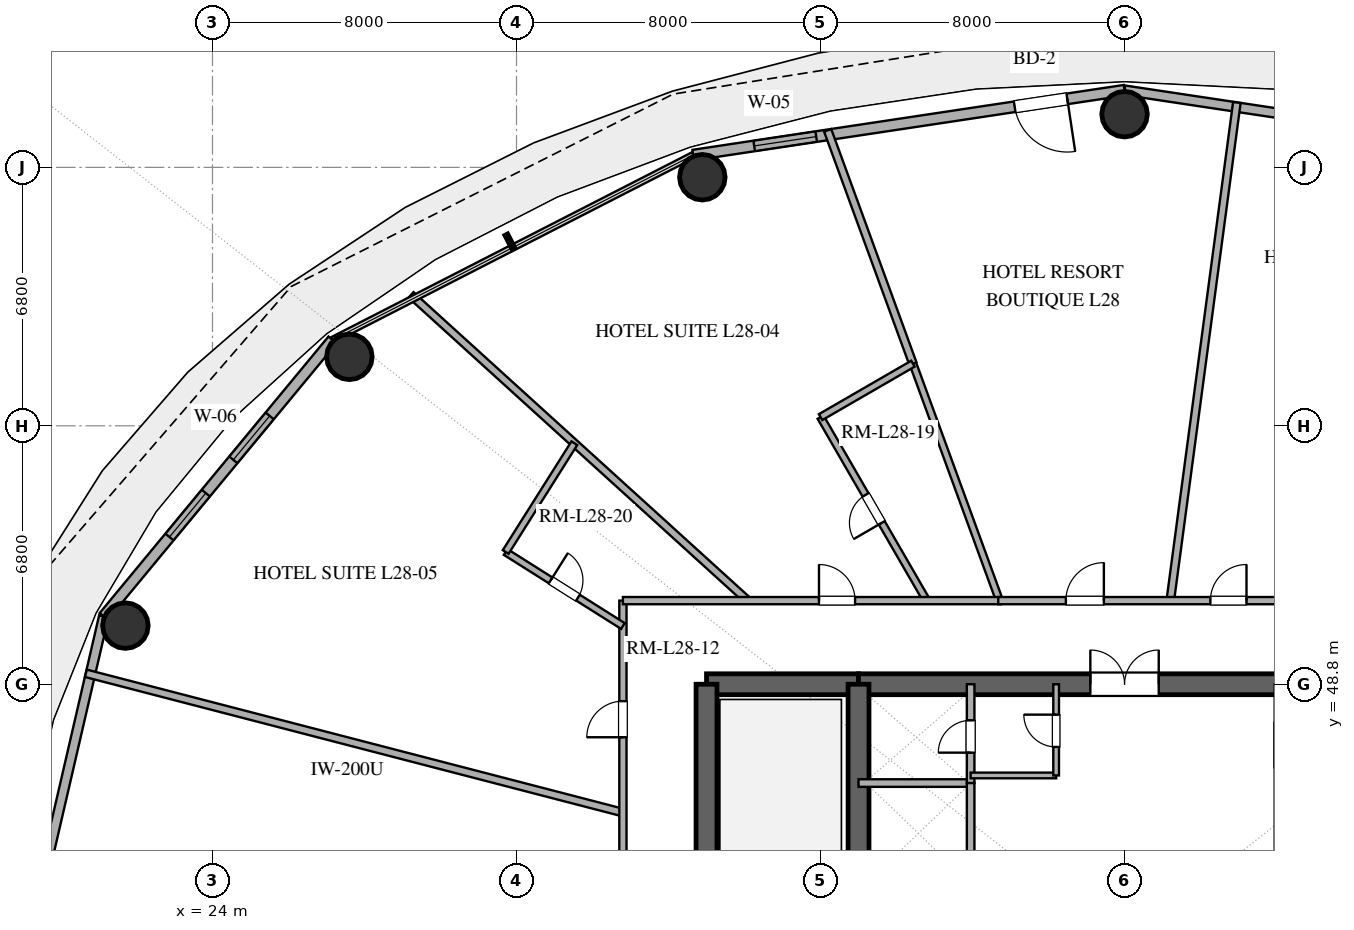
"""IFC4 building model, lengths in metres.
Left out: names, types, materials, properties, quantities, classifications, styles, units other than length and angle.
Written with IfcOpenShell. Run it as: python <this file> out.ifc"""

import sys

from ifc_helpers import new_model, si_unit, direction, frame, frame_2d, origin, origin_2d, place, context, subcontext, project, spatial, rectangle, hollow_circle, extrude, element, fill, save


model = new_model("IFC4")
c1 = context("Model", 3, precision=1e-05, world=origin(), true_north=direction((0.0, 1.0)))
c2 = subcontext(c1, "Body", "Model", "MODEL_VIEW")
j1 = project(units=[si_unit("LENGTHUNIT", "METRE"), si_unit("PLANEANGLEUNIT", "RADIAN")], contexts=[c1])
p1 = place(None, origin())
s1 = spatial("IfcSite", under=j1, at=p1, CompositionType="ELEMENT")
p2 = place(p1, origin())
s2 = spatial("IfcBuilding", under=s1, at=p2, CompositionType="ELEMENT")
p3 = place(p2, frame((0.0, 0.0, 112.8)))
s3 = spatial("IfcBuildingStorey", under=s2, at=p3, CompositionType="ELEMENT", Elevation=112.8)
p4 = place(p3, frame((37.0, 48.8, 0.0), z_axis=(0.0, 0.0, 1.0), x_axis=(1.0, 0.0, 0.0)))
e1 = element("IfcWall", 1, at=p4, inside=s3, PredefinedType="SHEAR", context=c2, shape_type="SweptSolid", body=[
    extrude(rectangle(XDim=4.0, YDim=0.55, at=frame_2d((2.0, 0.0))), origin(), (0.0, 0.0, 1.0), 3.38),
])
p5 = place(p3, frame((41.0, 48.8, 0.0), z_axis=(0.0, 0.0, 1.0), x_axis=(1.0, 0.0, 0.0)))
e2 = element("IfcWall", 2, at=p5, inside=s3, PredefinedType="SHEAR", context=c2, shape_type="SweptSolid", body=[
    extrude(rectangle(XDim=14.0, YDim=0.55, at=frame_2d((7.0, 0.0))), origin(), (0.0, 0.0, 1.0), 3.38),
])
p6 = place(p5, frame((6.1, 0.0, 0.0)))
e3 = element("IfcOpeningElement", 3, at=p6, cuts=e2, PredefinedType="OPENING", context=c2, shape_type="SweptSolid", body=[
    extrude(rectangle(XDim=1.8, YDim=2.25, at=frame_2d((0.9, 1.125))), frame((0.0, 0.285, 0.0), z_axis=(0.0, -1.0, 0.0), x_axis=(1.0, 0.0, 0.0)), (0.0, 0.0, 1.0), 0.57),
])
p7 = place(p3, frame((37.0, 35.2, 0.0), z_axis=(0.0, 0.0, 1.0), x_axis=(0.0, 1.0, 0.0)))
e4 = element("IfcWall", 4, at=p7, inside=s3, PredefinedType="SHEAR", context=c2, shape_type="SweptSolid", body=[
    extrude(rectangle(XDim=13.6, YDim=0.55, at=frame_2d((6.8, 0.0))), origin(), (0.0, 0.0, 1.0), 3.38),
])
p8 = place(p7, frame((1.5, 0.0, 0.0)))
e5 = element("IfcOpeningElement", 5, at=p8, cuts=e4, PredefinedType="OPENING", context=c2, shape_type="SweptSolid", body=[
    extrude(rectangle(XDim=1.2, YDim=2.15, at=frame_2d((0.6, 1.075))), frame((0.0, 0.285, 0.0), z_axis=(0.0, -1.0, 0.0), x_axis=(1.0, 0.0, 0.0)), (0.0, 0.0, 1.0), 0.57),
])
p9 = place(p3, frame((41.0, 35.2, 0.0), z_axis=(0.0, 0.0, 1.0), x_axis=(0.0, 1.0, 0.0)))
e6 = element("IfcWall", 6, at=p9, inside=s3, PredefinedType="SHEAR", context=c2, shape_type="SweptSolid", body=[
    extrude(rectangle(XDim=13.6, YDim=0.55, at=frame_2d((6.8, 0.0))), origin(), (0.0, 0.0, 1.0), 3.38),
])
p10 = place(p9, frame((1.15, 0.0, 0.0)))
e7 = element("IfcOpeningElement", 7, at=p10, cuts=e6, PredefinedType="OPENING", context=c2, shape_type="SweptSolid", body=[
    extrude(rectangle(XDim=1.1, YDim=2.2, at=frame_2d((0.55, 1.1))), frame((0.0, 0.285, 0.0), z_axis=(0.0, -1.0, 0.0), x_axis=(1.0, 0.0, 0.0)), (0.0, 0.0, 1.0), 0.57),
])
for number, where, z_axis, x_axis in (
    (8, (48.0, 63.8, 0.0), (0.0, 0.0, 1.0), (1.0, 0.0, 0.0)),
    (9, (36.89, 62.141, 0.0), (0.0, 0.0, 1.0), (1.0, 0.0, 0.0)),
    (10, (27.602, 57.415, 0.0), (0.0, 0.0, 1.0), (1.0, 0.0, 0.0)),
    (11, (21.709, 50.343, 0.0), (0.0, 0.0, 1.0), (1.0, 0.0, 0.0)),
):
    element("IfcColumn", number, at=place(p3, frame(where, z_axis=z_axis, x_axis=x_axis)), inside=s3, PredefinedType="COLUMN", context=c2, shape_type="SweptSolid", body=[
        extrude(hollow_circle(Radius=0.6, WallThickness=0.032, at=origin_2d()), origin(), (0.0, 0.0, 1.0), 3.38),
    ])
p11 = place(p3, frame((59.351, 62.723, 0.0), z_axis=(0.0, 0.0, 1.0), x_axis=(-0.988877774656, 0.148730450117, 0.0)))
e12 = element("IfcWall", 12, at=p11, inside=s3, PredefinedType="SOLIDWALL", context=c2, shape_type="SweptSolid", body=[
    extrude(rectangle(XDim=11.479, YDim=0.25, at=frame_2d((5.74, 0.0))), origin(), (0.0, 0.0, 1.0), 3.38),
])
p12 = place(p3, frame((48.0, 64.43, 0.0), z_axis=(0.0, 0.0, 1.0), x_axis=(-0.988877774656, -0.148730450117, 0.0)))
e13 = element("IfcWall", 13, at=p12, inside=s3, PredefinedType="SOLIDWALL", context=c2, shape_type="SweptSolid", body=[
    extrude(rectangle(XDim=11.479, YDim=0.28, at=frame_2d((5.74, 0.0))), origin(), (0.0, 0.0, 1.0), 3.38),
])
p13 = place(p12, frame((1.524, 0.0, 0.0)))
e14 = element("IfcOpeningElement", 14, at=p13, cuts=e13, PredefinedType="OPENING", context=c2, shape_type="SweptSolid", body=[
    extrude(rectangle(XDim=1.4, YDim=2.2, at=frame_2d((0.7, 1.1))), frame((0.0, 0.15, 0.0), z_axis=(0.0, -1.0, 0.0), x_axis=(1.0, 0.0, 0.0)), (0.0, 0.0, 1.0), 0.3),
])
p14 = place(p12, frame((8.205, 0.0, 0.85)))
e15 = element("IfcOpeningElement", 15, at=p14, cuts=e13, PredefinedType="OPENING", context=c2, shape_type="SweptSolid", body=[
    extrude(rectangle(XDim=1.65, YDim=2.0, at=frame_2d((0.825, 1.0))), frame((0.0, 0.15, 0.0), z_axis=(0.0, -1.0, 0.0), x_axis=(1.0, 0.0, 0.0)), (0.0, 0.0, 1.0), 0.3),
])
p15 = place(p3, frame((27.16, 57.86, 0.0), z_axis=(0.0, 0.0, 1.0), x_axis=(-0.637505817448, -0.770445541696, 0.0)))
e16 = element("IfcWall", 16, at=p15, inside=s3, PredefinedType="SOLIDWALL", context=c2, shape_type="SweptSolid", body=[
    extrude(rectangle(XDim=9.445, YDim=0.28, at=frame_2d((4.723, 0.0))), origin(), (0.0, 0.0, 1.0), 3.38),
])
p16 = place(p15, frame((2.597, 0.0, 0.85)))
e17 = element("IfcOpeningElement", 17, at=p16, cuts=e16, PredefinedType="OPENING", context=c2, shape_type="SweptSolid", body=[
    extrude(rectangle(XDim=1.5, YDim=2.0, at=frame_2d((0.75, 1.0))), frame((0.0, 0.15, 0.0), z_axis=(0.0, -1.0, 0.0), x_axis=(1.0, 0.0, 0.0)), (0.0, 0.0, 1.0), 0.3),
])
p17 = place(p15, frame((5.232, 0.0, 0.85)))
e18 = element("IfcOpeningElement", 18, at=p17, cuts=e16, PredefinedType="OPENING", context=c2, shape_type="SweptSolid", body=[
    extrude(rectangle(XDim=1.5, YDim=2.0, at=frame_2d((0.75, 1.0))), frame((0.0, 0.15, 0.0), z_axis=(0.0, -1.0, 0.0), x_axis=(1.0, 0.0, 0.0)), (0.0, 0.0, 1.0), 0.3),
])
p18 = place(p3, frame((21.139, 50.583, 0.0), z_axis=(0.0, 0.0, 1.0), x_axis=(-0.22558597182, -0.974223264616, 0.0)))
e19 = element("IfcWall", 19, at=p18, inside=s3, PredefinedType="SOLIDWALL", context=c2, shape_type="SweptSolid", body=[
    extrude(rectangle(XDim=8.811, YDim=0.25, at=frame_2d((4.405, 0.0))), origin(), (0.0, 0.0, 1.0), 3.38),
])
p19 = place(p3, frame((41.0, 46.2, 0.0), z_axis=(0.0, 0.0, 1.0), x_axis=(1.0, 0.0, 0.0)))
e20 = element("IfcWall", 20, at=p19, inside=s3, PredefinedType="SOLIDWALL", context=c2, shape_type="SweptSolid", body=[
    extrude(rectangle(XDim=2.95, YDim=0.2, at=frame_2d((1.475, 0.0))), origin(), (0.0, 0.0, 1.0), 2.74),
])
p20 = place(p3, frame((43.95, 46.2, 0.0), z_axis=(0.0, 0.0, 1.0), x_axis=(0.0, 1.0, 0.0)))
e21 = element("IfcWall", 21, at=p20, inside=s3, PredefinedType="SOLIDWALL", context=c2, shape_type="SweptSolid", body=[
    extrude(rectangle(XDim=2.6, YDim=0.2, at=frame_2d((1.3, 0.0))), origin(), (0.0, 0.0, 1.0), 2.74),
])
p21 = place(p20, frame((0.8, 0.0, 0.0)))
e22 = element("IfcOpeningElement", 22, at=p21, cuts=e21, PredefinedType="OPENING", context=c2, shape_type="SweptSolid", body=[
    extrude(rectangle(XDim=0.85, YDim=2.15, at=frame_2d((0.425, 1.075))), frame((0.0, 0.11, 0.0), z_axis=(0.0, -1.0, 0.0), x_axis=(1.0, 0.0, 0.0)), (0.0, 0.0, 1.0), 0.22),
])
p22 = place(p3, frame((43.95, 38.4, 0.0), z_axis=(0.0, 0.0, 1.0), x_axis=(0.0, 1.0, 0.0)))
e23 = element("IfcWall", 23, at=p22, inside=s3, PredefinedType="SOLIDWALL", context=c2, shape_type="SweptSolid", body=[
    extrude(rectangle(XDim=7.8, YDim=0.2, at=frame_2d((3.9, 0.0))), origin(), (0.0, 0.0, 1.0), 2.74),
])
p23 = place(p22, frame((0.7, 0.0, 0.0)))
e24 = element("IfcOpeningElement", 24, at=p23, cuts=e23, PredefinedType="OPENING", context=c2, shape_type="SweptSolid", body=[
    extrude(rectangle(XDim=1.1, YDim=2.2, at=frame_2d((0.55, 1.1))), frame((0.0, 0.11, 0.0), z_axis=(0.0, -1.0, 0.0), x_axis=(1.0, 0.0, 0.0)), (0.0, 0.0, 1.0), 0.22),
])
p24 = place(p22, frame((3.3, 0.0, 0.0)))
e25 = element("IfcOpeningElement", 25, at=p24, cuts=e23, PredefinedType="OPENING", context=c2, shape_type="SweptSolid", body=[
    extrude(rectangle(XDim=1.1, YDim=2.2, at=frame_2d((0.55, 1.1))), frame((0.0, 0.11, 0.0), z_axis=(0.0, -1.0, 0.0), x_axis=(1.0, 0.0, 0.0)), (0.0, 0.0, 1.0), 0.22),
])
p25 = place(p3, frame((43.95, 46.4, 0.0), z_axis=(0.0, 0.0, 1.0), x_axis=(1.0, 0.0, 0.0)))
e26 = element("IfcWall", 26, at=p25, inside=s3, PredefinedType="PARTITIONING", context=c2, shape_type="SweptSolid", body=[
    extrude(rectangle(XDim=2.25, YDim=0.15, at=frame_2d((1.125, 0.0))), origin(), (0.0, 0.0, 1.0), 2.74),
])
p26 = place(p3, frame((46.2, 46.4, 0.0), z_axis=(0.0, 0.0, 1.0), x_axis=(0.0, 1.0, 0.0)))
e27 = element("IfcWall", 27, at=p26, inside=s3, PredefinedType="PARTITIONING", context=c2, shape_type="SweptSolid", body=[
    extrude(rectangle(XDim=2.4, YDim=0.15, at=frame_2d((1.2, 0.0))), origin(), (0.0, 0.0, 1.0), 2.74),
])
p27 = place(p26, frame((0.75, 0.0, 0.0)))
e28 = element("IfcOpeningElement", 28, at=p27, cuts=e27, PredefinedType="OPENING", context=c2, shape_type="SweptSolid", body=[
    extrude(rectangle(XDim=0.85, YDim=2.15, at=frame_2d((0.425, 1.075))), frame((0.0, 0.085, 0.0), z_axis=(0.0, -1.0, 0.0), x_axis=(1.0, 0.0, 0.0)), (0.0, 0.0, 1.0), 0.17),
])
p28 = place(p3, frame((34.8, 45.423, 0.0), z_axis=(0.0, 0.0, 1.0), x_axis=(-0.967976280286, 0.251041671447, 0.0)))
e29 = element("IfcWall", 29, at=p28, inside=s3, PredefinedType="PARTITIONING", context=c2, shape_type="SweptSolid", body=[
    extrude(rectangle(XDim=14.598, YDim=0.2, at=frame_2d((7.299, 0.0))), origin(), (0.0, 0.0, 1.0), 2.74),
])
p29 = place(p3, frame((50.956, 64.107, 0.0), z_axis=(0.0, 0.0, 1.0), x_axis=(-0.132526518831, -0.99117945994, 0.0)))
e30 = element("IfcWall", 30, at=p29, inside=s3, PredefinedType="PARTITIONING", context=c2, shape_type="SweptSolid", body=[
    extrude(rectangle(XDim=13.223, YDim=0.2, at=frame_2d((6.612, 0.0))), origin(), (0.0, 0.0, 1.0), 2.74),
])
p30 = place(p3, frame((42.432, 57.234, 0.0), z_axis=(0.0, 0.0, 1.0), x_axis=(0.343307767445, -0.939222964376, 0.0)))
e31 = element("IfcWall", 31, at=p30, inside=s3, PredefinedType="PLUMBINGWALL", context=c2, shape_type="SweptSolid", body=[
    extrude(rectangle(XDim=6.638, YDim=0.18, at=frame_2d((3.319, 0.0))), origin(), (0.0, 0.0, 1.0), 2.74),
])
p31 = place(p3, frame((34.8, 36.329, 0.0), z_axis=(0.0, 0.0, 1.0), x_axis=(0.0, 1.0, 0.0)))
e32 = element("IfcWall", 32, at=p31, inside=s3, PredefinedType="PARTITIONING", context=c2, shape_type="SweptSolid", body=[
    extrude(rectangle(XDim=14.671, YDim=0.19, at=frame_2d((7.336, 0.0))), origin(), (0.0, 0.0, 1.0), 2.74),
])
p32 = place(p31, frame((5.341, 0.0, 0.0)))
e33 = element("IfcOpeningElement", 33, at=p32, cuts=e32, PredefinedType="OPENING", context=c2, shape_type="SweptSolid", body=[
    extrude(rectangle(XDim=1.0, YDim=2.2, at=frame_2d((0.5, 1.1))), frame((0.0, 0.105, 0.0), z_axis=(0.0, -1.0, 0.0), x_axis=(1.0, 0.0, 0.0)), (0.0, 0.0, 1.0), 0.21),
])
p33 = place(p31, frame((11.076, 0.0, 0.0)))
e34 = element("IfcOpeningElement", 34, at=p33, cuts=e32, PredefinedType="OPENING", context=c2, shape_type="SweptSolid", body=[
    extrude(rectangle(XDim=0.95, YDim=2.15, at=frame_2d((0.475, 1.075))), frame((0.0, 0.105, 0.0), z_axis=(0.0, -1.0, 0.0), x_axis=(1.0, 0.0, 0.0)), (0.0, 0.0, 1.0), 0.21),
])
p34 = place(p3, frame((40.188, 63.374, 0.0), z_axis=(0.0, 0.0, 1.0), x_axis=(0.343281030887, -0.939232736777, 0.0)))
e35 = element("IfcWall", 35, at=p34, inside=s3, PredefinedType="PARTITIONING", context=c2, shape_type="SweptSolid", body=[
    extrude(rectangle(XDim=6.537, YDim=0.2, at=frame_2d((3.268, 0.0))), origin(), (0.0, 0.0, 1.0), 2.74),
])
p35 = place(p3, frame((38.085, 51.0, 0.0), z_axis=(0.0, 0.0, 1.0), x_axis=(-0.74043922717, 0.672123315224, 0.0)))
e36 = element("IfcWall", 36, at=p35, inside=s3, PredefinedType="PARTITIONING", context=c2, shape_type="SweptSolid", body=[
    extrude(rectangle(XDim=11.968, YDim=0.2, at=frame_2d((5.984, 0.0))), origin(), (0.0, 0.0, 1.0), 2.74),
])
p36 = place(p3, frame((42.794, 51.0, 0.0), z_axis=(0.0, 0.0, 1.0), x_axis=(-0.500713600684, 0.865613014049, 0.0)))
e37 = element("IfcWall", 37, at=p36, inside=s3, PredefinedType="PLUMBINGWALL", context=c2, shape_type="SweptSolid", body=[
    extrude(rectangle(XDim=5.578, YDim=0.18, at=frame_2d((2.789, 0.0))), origin(), (0.0, 0.0, 1.0), 2.74),
])
p37 = place(p36, frame((2.364, 0.0, 0.0)))
e38 = element("IfcOpeningElement", 38, at=p37, cuts=e37, PredefinedType="OPENING", context=c2, shape_type="SweptSolid", body=[
    extrude(rectangle(XDim=0.85, YDim=2.1, at=frame_2d((0.425, 1.05))), frame((0.0, 0.1, 0.0), z_axis=(0.0, -1.0, 0.0), x_axis=(1.0, 0.0, 0.0)), (0.0, 0.0, 1.0), 0.2),
])
p38 = place(p3, frame((34.8, 51.0, 0.0), z_axis=(0.0, 0.0, 1.0), x_axis=(1.0, 0.0, 0.0)))
e39 = element("IfcWall", 39, at=p38, inside=s3, PredefinedType="PARTITIONING", context=c2, shape_type="SweptSolid", body=[
    extrude(rectangle(XDim=9.945, YDim=0.19, at=frame_2d((4.972, 0.0))), origin(), (0.0, 0.0, 1.0), 2.74),
])
p39 = place(p38, frame((5.159, 0.0, 0.0)))
e40 = element("IfcOpeningElement", 40, at=p39, cuts=e39, PredefinedType="OPENING", context=c2, shape_type="SweptSolid", body=[
    extrude(rectangle(XDim=0.95, YDim=2.15, at=frame_2d((0.475, 1.075))), frame((0.0, 0.105, 0.0), z_axis=(0.0, -1.0, 0.0), x_axis=(1.0, 0.0, 0.0)), (0.0, 0.0, 1.0), 0.21),
])
p40 = place(p3, frame((44.677, 51.0, 0.0), z_axis=(0.0, 0.0, 1.0), x_axis=(1.0, 0.0, 0.0)))
e41 = element("IfcWall", 41, at=p40, inside=s3, PredefinedType="PARTITIONING", context=c2, shape_type="SweptSolid", body=[
    extrude(rectangle(XDim=7.621, YDim=0.19, at=frame_2d((3.81, 0.0))), origin(), (0.0, 0.0, 1.0), 2.74),
])
p41 = place(p40, frame((1.78, 0.0, 0.0)))
e42 = element("IfcOpeningElement", 42, at=p41, cuts=e41, PredefinedType="OPENING", context=c2, shape_type="SweptSolid", body=[
    extrude(rectangle(XDim=1.0, YDim=2.2, at=frame_2d((0.5, 1.1))), frame((0.0, 0.105, 0.0), z_axis=(0.0, -1.0, 0.0), x_axis=(1.0, 0.0, 0.0)), (0.0, 0.0, 1.0), 0.21),
])
p42 = place(p40, frame((5.583, 0.0, 0.0)))
e43 = element("IfcOpeningElement", 43, at=p42, cuts=e41, PredefinedType="OPENING", context=c2, shape_type="SweptSolid", body=[
    extrude(rectangle(XDim=0.95, YDim=2.15, at=frame_2d((0.475, 1.075))), frame((0.0, 0.105, 0.0), z_axis=(0.0, -1.0, 0.0), x_axis=(1.0, 0.0, 0.0)), (0.0, 0.0, 1.0), 0.21),
])
p43 = place(p3, frame((31.715, 52.28, 0.0), z_axis=(0.0, 0.0, 1.0), x_axis=(0.845617675202, -0.533789047645, 0.0)))
e44 = element("IfcWall", 44, at=p43, inside=s3, PredefinedType="PLUMBINGWALL", context=c2, shape_type="SweptSolid", body=[
    extrude(rectangle(XDim=3.648, YDim=0.18, at=frame_2d((1.824, 0.0))), origin(), (0.0, 0.0, 1.0), 2.74),
])
p44 = place(p43, frame((1.399, 0.0, 0.0)))
e45 = element("IfcOpeningElement", 45, at=p44, cuts=e44, PredefinedType="OPENING", context=c2, shape_type="SweptSolid", body=[
    extrude(rectangle(XDim=0.85, YDim=2.1, at=frame_2d((0.425, 1.05))), frame((0.0, 0.1, 0.0), z_axis=(0.0, -1.0, 0.0), x_axis=(1.0, 0.0, 0.0)), (0.0, 0.0, 1.0), 0.2),
])
p45 = place(p3, frame((33.522, 55.142, 0.0), z_axis=(0.0, 0.0, 1.0), x_axis=(-0.533805735916, -0.845607140641, 0.0)))
e46 = element("IfcWall", 46, at=p45, inside=s3, PredefinedType="PLUMBINGWALL", context=c2, shape_type="SweptSolid", body=[
    extrude(rectangle(XDim=3.385, YDim=0.18, at=frame_2d((1.692, 0.0))), origin(), (0.0, 0.0, 1.0), 2.74),
])
p46 = place(p3, frame((40.001, 55.828, 0.0), z_axis=(0.0, 0.0, 1.0), x_axis=(0.865614723212, 0.50071064594, 0.0)))
e47 = element("IfcWall", 47, at=p46, inside=s3, PredefinedType="PLUMBINGWALL", context=c2, shape_type="SweptSolid", body=[
    extrude(rectangle(XDim=2.808, YDim=0.18, at=frame_2d((1.404, 0.0))), origin(), (0.0, 0.0, 1.0), 2.74),
])
p47 = place(p13, origin())
e48 = element("IfcDoor", 48, at=p47, inside=s3, OperationType="SINGLE_SWING_LEFT", PredefinedType="DOOR", context=c2, shape_type="SweptSolid", body=[
    extrude(rectangle(XDim=1.4, YDim=2.2, at=frame_2d((0.7, 1.1))), frame((0.0, 0.025, 0.0), z_axis=(0.0, -1.0, 0.0), x_axis=(1.0, 0.0, 0.0)), (0.0, 0.0, 1.0), 0.05),
])
fill(e14, e48)
p48 = place(p14, origin())
e49 = element("IfcWindow", 49, at=p48, inside=s3, PartitioningType="SINGLE_PANEL", PredefinedType="WINDOW", context=c2, shape_type="SweptSolid", body=[
    extrude(rectangle(XDim=1.65, YDim=2.0, at=frame_2d((0.825, 1.0))), frame((0.0, 0.03, 0.0), z_axis=(0.0, -1.0, 0.0), x_axis=(1.0, 0.0, 0.0)), (0.0, 0.0, 1.0), 0.06),
])
fill(e15, e49)
p49 = place(p16, origin())
e50 = element("IfcWindow", 50, at=p49, inside=s3, PartitioningType="SINGLE_PANEL", PredefinedType="WINDOW", context=c2, shape_type="SweptSolid", body=[
    extrude(rectangle(XDim=1.5, YDim=2.0, at=frame_2d((0.75, 1.0))), frame((0.0, 0.03, 0.0), z_axis=(0.0, -1.0, 0.0), x_axis=(1.0, 0.0, 0.0)), (0.0, 0.0, 1.0), 0.06),
])
fill(e17, e50)
p50 = place(p17, origin())
e51 = element("IfcWindow", 51, at=p50, inside=s3, PartitioningType="SINGLE_PANEL", PredefinedType="WINDOW", context=c2, shape_type="SweptSolid", body=[
    extrude(rectangle(XDim=1.5, YDim=2.0, at=frame_2d((0.75, 1.0))), frame((0.0, 0.03, 0.0), z_axis=(0.0, -1.0, 0.0), x_axis=(1.0, 0.0, 0.0)), (0.0, 0.0, 1.0), 0.06),
])
fill(e18, e51)
p51 = place(p6, origin())
e52 = element("IfcDoor", 52, at=p51, inside=s3, OperationType="DOUBLE_DOOR_SINGLE_SWING", PredefinedType="DOOR", context=c2, shape_type="SweptSolid", body=[
    extrude(rectangle(XDim=1.8, YDim=2.25, at=frame_2d((0.9, 1.125))), frame((0.0, 0.025, 0.0), z_axis=(0.0, -1.0, 0.0), x_axis=(1.0, 0.0, 0.0)), (0.0, 0.0, 1.0), 0.05),
])
fill(e3, e52)
p52 = place(p21, origin())
e53 = element("IfcDoor", 53, at=p52, inside=s3, OperationType="SINGLE_SWING_LEFT", PredefinedType="DOOR", context=c2, shape_type="SweptSolid", body=[
    extrude(rectangle(XDim=0.85, YDim=2.15, at=frame_2d((0.425, 1.075))), frame((0.0, 0.025, 0.0), z_axis=(0.0, -1.0, 0.0), x_axis=(1.0, 0.0, 0.0)), (0.0, 0.0, 1.0), 0.05),
])
fill(e22, e53)
p53 = place(p27, origin())
e54 = element("IfcDoor", 54, at=p53, inside=s3, OperationType="SINGLE_SWING_RIGHT", PredefinedType="DOOR", context=c2, shape_type="SweptSolid", body=[
    extrude(rectangle(XDim=0.85, YDim=2.15, at=frame_2d((0.425, 1.075))), frame((0.0, 0.025, 0.0), z_axis=(0.0, -1.0, 0.0), x_axis=(1.0, 0.0, 0.0)), (0.0, 0.0, 1.0), 0.05),
])
fill(e28, e54)
p54 = place(p33, origin())
e55 = element("IfcDoor", 55, at=p54, inside=s3, OperationType="SINGLE_SWING_LEFT", PredefinedType="DOOR", context=c2, shape_type="SweptSolid", body=[
    extrude(rectangle(XDim=0.95, YDim=2.15, at=frame_2d((0.475, 1.075))), frame((0.0, 0.025, 0.0), z_axis=(0.0, -1.0, 0.0), x_axis=(1.0, 0.0, 0.0)), (0.0, 0.0, 1.0), 0.05),
])
fill(e34, e55)
p55 = place(p37, origin())
e56 = element("IfcDoor", 56, at=p55, inside=s3, OperationType="SINGLE_SWING_LEFT", PredefinedType="DOOR", context=c2, shape_type="SweptSolid", body=[
    extrude(rectangle(XDim=0.85, YDim=2.1, at=frame_2d((0.425, 1.05))), frame((0.0, 0.025, 0.0), z_axis=(0.0, -1.0, 0.0), x_axis=(1.0, 0.0, 0.0)), (0.0, 0.0, 1.0), 0.05),
])
fill(e38, e56)
p56 = place(p39, origin())
e57 = element("IfcDoor", 57, at=p56, inside=s3, OperationType="SINGLE_SWING_LEFT", PredefinedType="DOOR", context=c2, shape_type="SweptSolid", body=[
    extrude(rectangle(XDim=0.95, YDim=2.15, at=frame_2d((0.475, 1.075))), frame((0.0, 0.025, 0.0), z_axis=(0.0, -1.0, 0.0), x_axis=(1.0, 0.0, 0.0)), (0.0, 0.0, 1.0), 0.05),
])
fill(e40, e57)
p57 = place(p41, origin())
e58 = element("IfcDoor", 58, at=p57, inside=s3, OperationType="SINGLE_SWING_RIGHT", PredefinedType="DOOR", context=c2, shape_type="SweptSolid", body=[
    extrude(rectangle(XDim=1.0, YDim=2.2, at=frame_2d((0.5, 1.1))), frame((0.0, 0.025, 0.0), z_axis=(0.0, -1.0, 0.0), x_axis=(1.0, 0.0, 0.0)), (0.0, 0.0, 1.0), 0.05),
])
fill(e42, e58)
p58 = place(p42, origin())
e59 = element("IfcDoor", 59, at=p58, inside=s3, OperationType="SINGLE_SWING_RIGHT", PredefinedType="DOOR", context=c2, shape_type="SweptSolid", body=[
    extrude(rectangle(XDim=0.95, YDim=2.15, at=frame_2d((0.475, 1.075))), frame((0.0, 0.025, 0.0), z_axis=(0.0, -1.0, 0.0), x_axis=(1.0, 0.0, 0.0)), (0.0, 0.0, 1.0), 0.05),
])
fill(e43, e59)
p59 = place(p44, origin())
e60 = element("IfcDoor", 60, at=p59, inside=s3, OperationType="SINGLE_SWING_LEFT", PredefinedType="DOOR", context=c2, shape_type="SweptSolid", body=[
    extrude(rectangle(XDim=0.85, YDim=2.1, at=frame_2d((0.425, 1.05))), frame((0.0, 0.025, 0.0), z_axis=(0.0, -1.0, 0.0), x_axis=(1.0, 0.0, 0.0)), (0.0, 0.0, 1.0), 0.05),
])
fill(e45, e60)
save(model, sys.argv[1])
